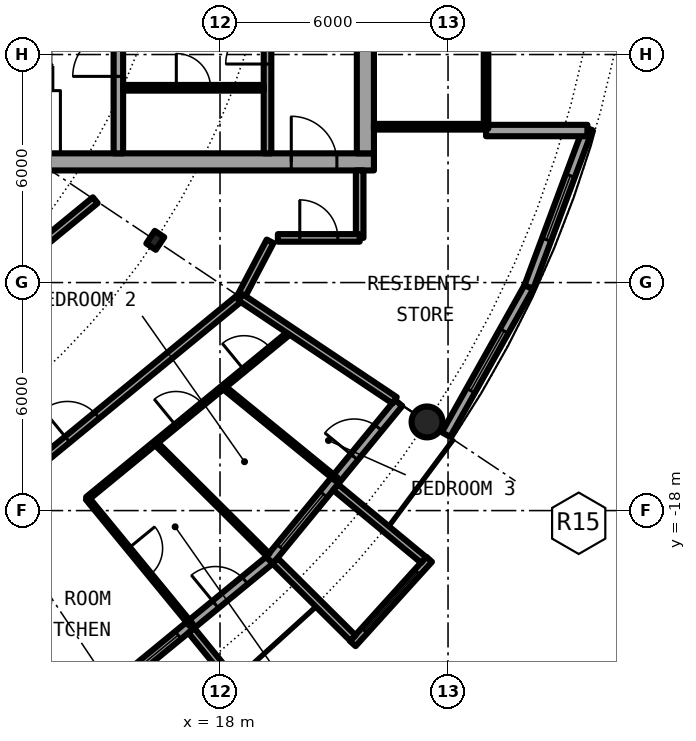
"""IFC4 building model, lengths in metres.
Left out: names, types, materials, properties, quantities, classifications, styles, units other than length and angle.
Written with IfcOpenShell. Run it as: python <this file> out.ifc"""

import sys

from ifc_helpers import new_model, si_unit, direction, frame, frame_2d, origin, origin_2d, place, context, subcontext, project, spatial, rectangle, circle, hollow_circle, i_section, extrude, element, fill, save


model = new_model("IFC4")
c1 = context("Model", 3, precision=1e-05, world=origin(), true_north=direction((0.0, 1.0)))
c2 = subcontext(c1, "Body", "Model", "MODEL_VIEW")
j1 = project(units=[si_unit("LENGTHUNIT", "METRE"), si_unit("PLANEANGLEUNIT", "RADIAN")], contexts=[c1])
p1 = place(None, origin())
s1 = spatial("IfcSite", under=j1, at=p1, CompositionType="ELEMENT")
p2 = place(p1, origin())
s2 = spatial("IfcBuilding", under=s1, at=p2, CompositionType="ELEMENT")
p3 = place(p2, frame((0.0, 0.0, 199.35)))
s3 = spatial("IfcBuildingStorey", under=s2, at=p3, CompositionType="ELEMENT", Elevation=199.35)
p4 = place(p3, frame((23.448, -15.667, 0.0), z_axis=(0.0, 0.0, 1.0), x_axis=(1.0, 0.0, 0.0)))
e1 = element("IfcColumn", 1, at=p4, inside=s3, PredefinedType="COLUMN", context=c2, shape_type="SweptSolid", body=[
    extrude(hollow_circle(Radius=0.406, WallThickness=0.03, at=origin_2d()), origin(), (0.0, 0.0, 1.0), 3.05),
])
p5 = place(p3, frame((16.297, -10.889, 0.0), z_axis=(0.0, 0.0, 1.0), x_axis=(0.831469612303, -0.55557023302, 0.0)))
e2 = element("IfcColumn", 2, at=p5, inside=s3, PredefinedType="COLUMN", context=c2, shape_type="SweptSolid", body=[
    extrude(i_section(OverallWidth=0.3, OverallDepth=0.4, WebThickness=0.013, FlangeThickness=0.024, FilletRadius=0.027, at=origin_2d()), origin(), (0.0, 0.0, 1.0), 3.05),
])
p6 = place(p3, frame((15.167, -22.699, 0.0), z_axis=(0.0, 0.0, 1.0), x_axis=(0.773019449054, 0.634382322723, 0.0)))
e3 = element("IfcWall", 3, at=p6, inside=s3, PredefinedType="SOLIDWALL", context=c2, shape_type="SweptSolid", body=[
    extrude(rectangle(XDim=5.352, YDim=0.25, at=frame_2d((2.676, 0.0))), origin(), (0.0, 0.0, 1.0), 2.7),
])
p7 = place(p6, frame((0.441, 0.0, 0.3)))
e4 = element("IfcOpeningElement", 4, at=p7, cuts=e3, PredefinedType="OPENING", context=c2, shape_type="SweptSolid", body=[
    extrude(rectangle(XDim=1.8, YDim=2.1, at=frame_2d((0.9, 1.05))), frame((0.0, 0.135, 0.0), z_axis=(0.0, -1.0, 0.0), x_axis=(1.0, 0.0, 0.0)), (0.0, 0.0, 1.0), 0.27),
])
p8 = place(p6, frame((3.51, 0.0, 0.0)))
e5 = element("IfcOpeningElement", 5, at=p8, cuts=e3, PredefinedType="OPENING", context=c2, shape_type="SweptSolid", body=[
    extrude(rectangle(XDim=1.0, YDim=2.2, at=frame_2d((0.5, 1.1))), frame((0.0, 0.135, 0.0), z_axis=(0.0, -1.0, 0.0), x_axis=(1.0, 0.0, 0.0)), (0.0, 0.0, 1.0), 0.27),
])
p9 = place(p3, frame((17.246, -21.155, -0.03), z_axis=(0.0, 0.0, 1.0), x_axis=(0.631741648902, -0.775179004516, 0.0)))
e6 = element("IfcWall", 6, at=p9, inside=s3, PredefinedType="SOLIDWALL", context=c2, shape_type="SweptSolid", body=[
    extrude(rectangle(XDim=3.006, YDim=0.2, at=frame_2d((1.503, 0.0))), origin(), (0.0, 0.0, 1.0), 2.73),
])
p10 = place(p3, frame((19.304, -19.304, 0.0), z_axis=(0.0, 0.0, 1.0), x_axis=(0.634382322723, 0.773019449054, 0.0)))
e7 = element("IfcWall", 7, at=p10, inside=s3, PredefinedType="SOLIDWALL", context=c2, shape_type="SweptSolid", body=[
    extrude(rectangle(XDim=5.352, YDim=0.25, at=frame_2d((2.676, 0.0))), origin(), (0.0, 0.0, 1.0), 2.7),
])
p11 = place(p10, frame((0.441, 0.0, 0.3)))
e8 = element("IfcOpeningElement", 8, at=p11, cuts=e7, PredefinedType="OPENING", context=c2, shape_type="SweptSolid", body=[
    extrude(rectangle(XDim=1.8, YDim=2.1, at=frame_2d((0.9, 1.05))), frame((0.0, 0.135, 0.0), z_axis=(0.0, -1.0, 0.0), x_axis=(1.0, 0.0, 0.0)), (0.0, 0.0, 1.0), 0.27),
])
p12 = place(p10, frame((3.51, 0.0, 0.0)))
e9 = element("IfcOpeningElement", 9, at=p12, cuts=e7, PredefinedType="OPENING", context=c2, shape_type="SweptSolid", body=[
    extrude(rectangle(XDim=1.0, YDim=2.2, at=frame_2d((0.5, 1.1))), frame((0.0, 0.135, 0.0), z_axis=(0.0, -1.0, 0.0), x_axis=(1.0, 0.0, 0.0)), (0.0, 0.0, 1.0), 0.27),
])
p13 = place(p3, frame((21.493, -21.5, -0.03), z_axis=(0.0, 0.0, 1.0), x_axis=(0.671506829416, 0.740998365753, 0.0)))
e10 = element("IfcWall", 10, at=p13, inside=s3, PredefinedType="SOLIDWALL", context=c2, shape_type="SweptSolid", body=[
    extrude(rectangle(XDim=2.993, YDim=0.2, at=frame_2d((1.497, 0.0))), origin(), (0.0, 0.0, 1.0), 2.73),
])
p14 = place(p13, frame((0.457, 0.0, 0.33)))
e11 = element("IfcOpeningElement", 11, at=p14, cuts=e10, PredefinedType="OPENING", context=c2, shape_type="SweptSolid", body=[
    extrude(circle(Radius=1.04, at=frame_2d((1.04, 1.04))), frame((0.0, 0.11, 0.0), z_axis=(0.0, -1.0, 0.0), x_axis=(1.0, 0.0, 0.0)), (0.0, 0.0, 1.0), 0.22),
])
p15 = place(p3, frame((19.45, -19.323, -0.03), z_axis=(0.0, 0.0, 1.0), x_axis=(0.709727076896, -0.704476739375, 0.0)))
e12 = element("IfcWall", 12, at=p15, inside=s3, PredefinedType="SOLIDWALL", context=c2, shape_type="SweptSolid", body=[
    extrude(rectangle(XDim=2.883, YDim=0.2, at=frame_2d((1.441, 0.0))), origin(), (0.0, 0.0, 1.0), 2.73),
])
p16 = place(p3, frame((21.041, -17.384, -0.03), z_axis=(0.0, 0.0, 1.0), x_axis=(0.770784861449, -0.63709551667, 0.0)))
e13 = element("IfcWall", 13, at=p16, inside=s3, PredefinedType="SOLIDWALL", context=c2, shape_type="SweptSolid", body=[
    extrude(rectangle(XDim=3.006, YDim=0.2, at=frame_2d((1.503, 0.0))), origin(), (0.0, 0.0, 1.0), 2.73),
])
p17 = place(p3, frame((23.946, -16.0, 0.0), z_axis=(0.0, 0.0, 1.0), x_axis=(0.489696356642, 0.871893042919, 0.0)))
e14 = element("IfcWall", 14, at=p17, inside=s3, PredefinedType="SOLIDWALL", context=c2, shape_type="SweptSolid", body=[
    extrude(rectangle(XDim=4.454, YDim=0.25, at=frame_2d((2.227, 0.0))), origin(), (0.0, 0.0, 1.0), 2.7),
])
p18 = place(p17, frame((1.327, 0.0, 0.3)))
e15 = element("IfcOpeningElement", 15, at=p18, cuts=e14, PredefinedType="OPENING", context=c2, shape_type="SweptSolid", body=[
    extrude(rectangle(XDim=1.8, YDim=2.1, at=frame_2d((0.9, 1.05))), frame((0.0, 0.135, 0.0), z_axis=(0.0, -1.0, 0.0), x_axis=(1.0, 0.0, 0.0)), (0.0, 0.0, 1.0), 0.27),
])
p19 = place(p3, frame((26.127, -12.117, 0.0), z_axis=(0.0, 0.0, 1.0), x_axis=(0.349247811493, 0.937030397675, 0.0)))
e16 = element("IfcWall", 16, at=p19, inside=s3, PredefinedType="SOLIDWALL", context=c2, shape_type="SweptSolid", body=[
    extrude(rectangle(XDim=4.452, YDim=0.25, at=frame_2d((2.226, 0.0))), origin(), (0.0, 0.0, 1.0), 2.7),
])
p20 = place(p19, frame((1.327, 0.0, 0.3)))
e17 = element("IfcOpeningElement", 17, at=p20, cuts=e16, PredefinedType="OPENING", context=c2, shape_type="SweptSolid", body=[
    extrude(rectangle(XDim=1.8, YDim=2.1, at=frame_2d((0.9, 1.05))), frame((0.0, 0.135, 0.0), z_axis=(0.0, -1.0, 0.0), x_axis=(1.0, 0.0, 0.0)), (0.0, 0.0, 1.0), 0.27),
])
p21 = place(p3, frame((25.0, -8.0, 0.0), z_axis=(0.0, 0.0, 1.0), x_axis=(1.0, 0.0, 0.0)))
e18 = element("IfcWall", 18, at=p21, inside=s3, PredefinedType="SOLIDWALL", context=c2, shape_type="SweptSolid", body=[
    extrude(rectangle(XDim=2.667, YDim=0.3, at=frame_2d((1.333, 0.0))), origin(), (0.0, 0.0, 1.0), 2.7),
])
p22 = place(p3, frame((8.55, -8.825, 0.0), z_axis=(0.0, 0.0, 1.0), x_axis=(1.0, 0.0, 0.0)))
e19 = element("IfcWall", 19, at=p22, inside=s3, PredefinedType="SHEAR", context=c2, shape_type="SweptSolid", body=[
    extrude(rectangle(XDim=13.5, YDim=0.45, at=frame_2d((6.75, 0.0))), origin(), (0.0, 0.0, 1.0), 3.05),
])
p23 = place(p22, frame((11.325, 0.0, 0.0)))
e20 = element("IfcOpeningElement", 20, at=p23, cuts=e19, PredefinedType="OPENING", context=c2, shape_type="SweptSolid", body=[
    extrude(rectangle(XDim=1.2, YDim=2.3, at=frame_2d((0.6, 1.15))), frame((0.0, 0.235, 0.0), z_axis=(0.0, -1.0, 0.0), x_axis=(1.0, 0.0, 0.0)), (0.0, 0.0, 1.0), 0.47),
])
p24 = place(p3, frame((21.825, 8.6, 0.0), z_axis=(0.0, 0.0, 1.0), x_axis=(0.0, -1.0, 0.0)))
e21 = element("IfcWall", 21, at=p24, inside=s3, PredefinedType="SHEAR", context=c2, shape_type="SweptSolid", body=[
    extrude(rectangle(XDim=17.2, YDim=0.45, at=frame_2d((8.6, 0.0))), origin(), (0.0, 0.0, 1.0), 3.05),
])
p25 = place(p24, frame((7.7, 0.0, 0.0)))
e22 = element("IfcOpeningElement", 22, at=p25, cuts=e21, PredefinedType="OPENING", context=c2, shape_type="SweptSolid", body=[
    extrude(rectangle(XDim=1.8, YDim=2.3, at=frame_2d((0.9, 1.15))), frame((0.0, 0.235, 0.0), z_axis=(0.0, -1.0, 0.0), x_axis=(1.0, 0.0, 0.0)), (0.0, 0.0, 1.0), 0.47),
])
p26 = place(p3, frame((15.325, -8.6, 0.0), z_axis=(0.0, 0.0, 1.0), x_axis=(0.0, 1.0, 0.0)))
e23 = element("IfcWall", 23, at=p26, inside=s3, PredefinedType="SHEAR", context=c2, shape_type="SweptSolid", body=[
    extrude(rectangle(XDim=3.95, YDim=0.25, at=frame_2d((1.975, 0.0))), origin(), (0.0, 0.0, 1.0), 3.05),
])
p27 = place(p26, frame((2.025, 0.0, 0.0)))
e24 = element("IfcOpeningElement", 24, at=p27, cuts=e23, PredefinedType="OPENING", context=c2, shape_type="SweptSolid", body=[
    extrude(rectangle(XDim=1.2, YDim=2.3, at=frame_2d((0.6, 1.15))), frame((0.0, 0.135, 0.0), z_axis=(0.0, -1.0, 0.0), x_axis=(1.0, 0.0, 0.0)), (0.0, 0.0, 1.0), 0.27),
])
p28 = place(p3, frame((19.25, -8.6, 0.0), z_axis=(0.0, 0.0, 1.0), x_axis=(0.0, 1.0, 0.0)))
e25 = element("IfcWall", 25, at=p28, inside=s3, PredefinedType="SOLIDWALL", context=c2, shape_type="SweptSolid", body=[
    extrude(rectangle(XDim=7.025, YDim=0.2, at=frame_2d((3.513, 0.0))), origin(), (0.0, 0.0, 1.0), 2.7),
])
p29 = place(p28, frame((2.35, 0.0, 0.0)))
e26 = element("IfcOpeningElement", 26, at=p29, cuts=e25, PredefinedType="OPENING", context=c2, shape_type="SweptSolid", body=[
    extrude(rectangle(XDim=1.1, YDim=2.3, at=frame_2d((0.55, 1.15))), frame((0.0, 0.11, 0.0), z_axis=(0.0, -1.0, 0.0), x_axis=(1.0, 0.0, 0.0)), (0.0, 0.0, 1.0), 0.22),
])
p30 = place(p3, frame((15.45, -6.875, 0.0), z_axis=(0.0, 0.0, 1.0), x_axis=(1.0, 0.0, 0.0)))
e27 = element("IfcWall", 27, at=p30, inside=s3, PredefinedType="PARTITIONING", context=c2, shape_type="SweptSolid", body=[
    extrude(rectangle(XDim=3.7, YDim=0.15, at=frame_2d((1.85, 0.0))), origin(), (0.0, 0.0, 1.0), 2.7),
])
p31 = place(p30, frame((1.4, 0.0, 0.0)))
e28 = element("IfcOpeningElement", 28, at=p31, cuts=e27, PredefinedType="OPENING", context=c2, shape_type="SweptSolid", body=[
    extrude(rectangle(XDim=0.9, YDim=2.3, at=frame_2d((0.45, 1.15))), frame((0.0, 0.085, 0.0), z_axis=(0.0, -1.0, 0.0), x_axis=(1.0, 0.0, 0.0)), (0.0, 0.0, 1.0), 0.17),
])
p32 = place(p3, frame((22.05, -7.9, 0.0), z_axis=(0.0, 0.0, 1.0), x_axis=(1.0, 0.0, 0.0)))
e29 = element("IfcWall", 29, at=p32, inside=s3, PredefinedType="PARTITIONING", context=c2, shape_type="SweptSolid", body=[
    extrude(rectangle(XDim=2.89, YDim=0.15, at=frame_2d((1.445, 0.0))), origin(), (0.0, 0.0, 1.0), 2.7),
])
p33 = place(p3, frame((25.0, -7.95, 0.0), z_axis=(0.0, 0.0, 1.0), x_axis=(0.0, 1.0, 0.0)))
e30 = element("IfcWall", 30, at=p33, inside=s3, PredefinedType="PARTITIONING", context=c2, shape_type="SweptSolid", body=[
    extrude(rectangle(XDim=15.9, YDim=0.12, at=frame_2d((7.95, 0.0))), origin(), (0.0, 0.0, 1.0), 2.7),
])
p34 = place(p33, frame((0.95, 0.0, 0.1)))
e31 = element("IfcOpeningElement", 31, at=p34, cuts=e30, PredefinedType="OPENING", context=c2, shape_type="SweptSolid", body=[
    extrude(rectangle(XDim=14.0, YDim=2.35, at=frame_2d((7.0, 1.175))), frame((0.0, 0.07, 0.0), z_axis=(0.0, -1.0, 0.0), x_axis=(1.0, 0.0, 0.0)), (0.0, 0.0, 1.0), 0.14),
])
p35 = place(p3, frame((14.508, -17.681, 0.0), z_axis=(0.0, 0.0, 1.0), x_axis=(0.773155647559, 0.634216323227, 0.0)))
e32 = element("IfcWall", 32, at=p35, inside=s3, PredefinedType="PARTITIONING", context=c2, shape_type="SweptSolid", body=[
    extrude(rectangle(XDim=6.939, YDim=0.1, at=frame_2d((3.469, 0.0))), origin(), (0.0, 0.0, 1.0), 2.7),
])
p36 = place(p35, frame((3.019, 0.0, 0.0)))
e33 = element("IfcOpeningElement", 33, at=p36, cuts=e32, PredefinedType="OPENING", context=c2, shape_type="SweptSolid", body=[
    extrude(rectangle(XDim=0.9, YDim=2.3, at=frame_2d((0.45, 1.15))), frame((0.0, 0.06, 0.0), z_axis=(0.0, -1.0, 0.0), x_axis=(1.0, 0.0, 0.0)), (0.0, 0.0, 1.0), 0.12),
])
p37 = place(p35, frame((5.334, 0.0, 0.0)))
e34 = element("IfcOpeningElement", 34, at=p37, cuts=e32, PredefinedType="OPENING", context=c2, shape_type="SweptSolid", body=[
    extrude(rectangle(XDim=0.9, YDim=2.3, at=frame_2d((0.45, 1.15))), frame((0.0, 0.06, 0.0), z_axis=(0.0, -1.0, 0.0), x_axis=(1.0, 0.0, 0.0)), (0.0, 0.0, 1.0), 0.12),
])
p38 = place(p3, frame((18.542, -12.389, 0.0), z_axis=(0.0, 0.0, 1.0), x_axis=(0.465359652486, 0.885121683068, 0.0)))
e35 = element("IfcWall", 35, at=p38, inside=s3, PredefinedType="PARTITIONING", context=c2, shape_type="SweptSolid", body=[
    extrude(rectangle(XDim=1.665, YDim=0.2, at=frame_2d((0.833, 0.0))), origin(), (0.0, 0.0, 1.0), 2.7),
])
p39 = place(p3, frame((21.675, -10.825, 0.0), z_axis=(0.0, 0.0, 1.0), x_axis=(0.0, 1.0, 0.0)))
e36 = element("IfcWall", 36, at=p39, inside=s3, PredefinedType="PARTITIONING", context=c2, shape_type="SweptSolid", body=[
    extrude(rectangle(XDim=1.775, YDim=0.2, at=frame_2d((0.887, 0.0))), origin(), (0.0, 0.0, 1.0), 2.7),
])
p40 = place(p3, frame((8.534, -20.603, 0.0), z_axis=(0.0, 0.0, 1.0), x_axis=(0.772983503654, 0.634426121056, 0.0)))
e37 = element("IfcWall", 37, at=p40, inside=s3, PredefinedType="PARTITIONING", context=c2, shape_type="SweptSolid", body=[
    extrude(rectangle(XDim=12.947, YDim=0.2, at=frame_2d((6.474, 0.0))), origin(), (0.0, 0.0, 1.0), 2.7),
])
p41 = place(p40, frame((7.053, 0.0, 0.0)))
e38 = element("IfcOpeningElement", 38, at=p41, cuts=e37, PredefinedType="OPENING", context=c2, shape_type="SweptSolid", body=[
    extrude(rectangle(XDim=1.0, YDim=2.3, at=frame_2d((0.5, 1.15))), frame((0.0, 0.11, 0.0), z_axis=(0.0, -1.0, 0.0), x_axis=(1.0, 0.0, 0.0)), (0.0, 0.0, 1.0), 0.22),
])
p42 = place(p3, frame((6.773, -16.353, 0.0), z_axis=(0.0, 0.0, 1.0), x_axis=(0.773034536097, 0.634363938131, 0.0)))
e39 = element("IfcWall", 39, at=p42, inside=s3, PredefinedType="PARTITIONING", context=c2, shape_type="SweptSolid", body=[
    extrude(rectangle(XDim=10.277, YDim=0.2, at=frame_2d((5.138, 0.0))), origin(), (0.0, 0.0, 1.0), 2.7),
])
p43 = place(p42, frame((4.638, 0.0, 0.0)))
e40 = element("IfcOpeningElement", 40, at=p43, cuts=e39, PredefinedType="OPENING", context=c2, shape_type="SweptSolid", body=[
    extrude(rectangle(XDim=1.0, YDim=2.3, at=frame_2d((0.5, 1.15))), frame((0.0, 0.11, 0.0), z_axis=(0.0, -1.0, 0.0), x_axis=(1.0, 0.0, 0.0)), (0.0, 0.0, 1.0), 0.22),
])
p44 = place(p3, frame((19.523, -10.825, 0.0), z_axis=(0.0, 0.0, 1.0), x_axis=(1.0, 0.0, 0.0)))
e41 = element("IfcWall", 41, at=p44, inside=s3, PredefinedType="PARTITIONING", context=c2, shape_type="SweptSolid", body=[
    extrude(rectangle(XDim=2.152, YDim=0.2, at=frame_2d((1.076, 0.0))), origin(), (0.0, 0.0, 1.0), 2.7),
])
p45 = place(p44, frame((0.576, 0.0, 0.0)))
e42 = element("IfcOpeningElement", 42, at=p45, cuts=e41, PredefinedType="OPENING", context=c2, shape_type="SweptSolid", body=[
    extrude(rectangle(XDim=1.0, YDim=2.3, at=frame_2d((0.5, 1.15))), frame((0.0, 0.11, 0.0), z_axis=(0.0, -1.0, 0.0), x_axis=(1.0, 0.0, 0.0)), (0.0, 0.0, 1.0), 0.22),
])
p46 = place(p3, frame((14.509, -17.679, 0.0), z_axis=(0.0, 0.0, 1.0), x_axis=(0.634342681687, -0.77305197897, 0.0)))
e43 = element("IfcWall", 43, at=p46, inside=s3, PredefinedType="PARTITIONING", context=c2, shape_type="SweptSolid", body=[
    extrude(rectangle(XDim=4.305, YDim=0.1, at=frame_2d((2.153, 0.0))), origin(), (0.0, 0.0, 1.0), 2.7),
])
p47 = place(p46, frame((1.703, 0.0, 0.0)))
e44 = element("IfcOpeningElement", 44, at=p47, cuts=e43, PredefinedType="OPENING", context=c2, shape_type="SweptSolid", body=[
    extrude(rectangle(XDim=0.9, YDim=2.3, at=frame_2d((0.45, 1.15))), frame((0.0, 0.06, 0.0), z_axis=(0.0, -1.0, 0.0), x_axis=(1.0, 0.0, 0.0)), (0.0, 0.0, 1.0), 0.12),
])
p48 = place(p3, frame((16.296, -16.213, 0.0), z_axis=(0.0, 0.0, 1.0), x_axis=(0.708999026534, -0.705209458511, 0.0)))
e45 = element("IfcWall", 45, at=p48, inside=s3, PredefinedType="PARTITIONING", context=c2, shape_type="SweptSolid", body=[
    extrude(rectangle(XDim=4.188, YDim=0.1, at=frame_2d((2.094, 0.0))), origin(), (0.0, 0.0, 1.0), 2.7),
])
p49 = place(p3, frame((18.084, -14.745, 0.0), z_axis=(0.0, 0.0, 1.0), x_axis=(0.77495020745, -0.632022290724, 0.0)))
e46 = element("IfcWall", 46, at=p49, inside=s3, PredefinedType="PARTITIONING", context=c2, shape_type="SweptSolid", body=[
    extrude(rectangle(XDim=3.842, YDim=0.1, at=frame_2d((1.921, 0.0))), origin(), (0.0, 0.0, 1.0), 2.7),
])
p50 = place(p3, frame((18.542, -12.389, 0.0), z_axis=(0.0, 0.0, 1.0), x_axis=(0.831387096605, -0.55569370664, 0.0)))
e47 = element("IfcWall", 47, at=p50, inside=s3, PredefinedType="PARTITIONING", context=c2, shape_type="SweptSolid", body=[
    extrude(rectangle(XDim=4.875, YDim=0.2, at=frame_2d((2.438, 0.0))), origin(), (0.0, 0.0, 1.0), 2.7),
])
p51 = place(p7, origin())
e48 = element("IfcWindow", 48, at=p51, inside=s3, PartitioningType="SINGLE_PANEL", PredefinedType="WINDOW", context=c2, shape_type="SweptSolid", body=[
    extrude(rectangle(XDim=1.8, YDim=2.1, at=frame_2d((0.9, 1.05))), frame((0.0, 0.03, 0.0), z_axis=(0.0, -1.0, 0.0), x_axis=(1.0, 0.0, 0.0)), (0.0, 0.0, 1.0), 0.06),
])
fill(e4, e48)
p52 = place(p8, origin())
e49 = element("IfcDoor", 49, at=p52, inside=s3, OperationType="SINGLE_SWING_LEFT", PredefinedType="DOOR", context=c2, shape_type="SweptSolid", body=[
    extrude(rectangle(XDim=1.0, YDim=2.2, at=frame_2d((0.5, 1.1))), frame((0.0, 0.025, 0.0), z_axis=(0.0, -1.0, 0.0), x_axis=(1.0, 0.0, 0.0)), (0.0, 0.0, 1.0), 0.05),
])
fill(e5, e49)
p53 = place(p11, origin())
e50 = element("IfcWindow", 50, at=p53, inside=s3, PartitioningType="SINGLE_PANEL", PredefinedType="WINDOW", context=c2, shape_type="SweptSolid", body=[
    extrude(rectangle(XDim=1.8, YDim=2.1, at=frame_2d((0.9, 1.05))), frame((0.0, 0.03, 0.0), z_axis=(0.0, -1.0, 0.0), x_axis=(1.0, 0.0, 0.0)), (0.0, 0.0, 1.0), 0.06),
])
fill(e8, e50)
p54 = place(p14, origin())
e51 = element("IfcWindow", 51, at=p54, inside=s3, PartitioningType="SINGLE_PANEL", PredefinedType="WINDOW", context=c2, shape_type="SweptSolid", body=[
    extrude(circle(Radius=1.04, at=frame_2d((1.04, 1.04))), frame((0.0, 0.03, 0.0), z_axis=(0.0, -1.0, 0.0), x_axis=(1.0, 0.0, 0.0)), (0.0, 0.0, 1.0), 0.06),
])
fill(e11, e51)
p55 = place(p12, origin())
e52 = element("IfcDoor", 52, at=p55, inside=s3, OperationType="SINGLE_SWING_LEFT", PredefinedType="DOOR", context=c2, shape_type="SweptSolid", body=[
    extrude(rectangle(XDim=1.0, YDim=2.2, at=frame_2d((0.5, 1.1))), frame((0.0, 0.025, 0.0), z_axis=(0.0, -1.0, 0.0), x_axis=(1.0, 0.0, 0.0)), (0.0, 0.0, 1.0), 0.05),
])
fill(e9, e52)
p56 = place(p18, origin())
e53 = element("IfcWindow", 53, at=p56, inside=s3, PartitioningType="SINGLE_PANEL", PredefinedType="WINDOW", context=c2, shape_type="SweptSolid", body=[
    extrude(rectangle(XDim=1.8, YDim=2.1, at=frame_2d((0.9, 1.05))), frame((0.0, 0.03, 0.0), z_axis=(0.0, -1.0, 0.0), x_axis=(1.0, 0.0, 0.0)), (0.0, 0.0, 1.0), 0.06),
])
fill(e15, e53)
p57 = place(p20, origin())
e54 = element("IfcWindow", 54, at=p57, inside=s3, PartitioningType="SINGLE_PANEL", PredefinedType="WINDOW", context=c2, shape_type="SweptSolid", body=[
    extrude(rectangle(XDim=1.8, YDim=2.1, at=frame_2d((0.9, 1.05))), frame((0.0, 0.03, 0.0), z_axis=(0.0, -1.0, 0.0), x_axis=(1.0, 0.0, 0.0)), (0.0, 0.0, 1.0), 0.06),
])
fill(e17, e54)
p58 = place(p31, origin())
e55 = element("IfcDoor", 55, at=p58, inside=s3, OperationType="SINGLE_SWING_LEFT", PredefinedType="DOOR", context=c2, shape_type="SweptSolid", body=[
    extrude(rectangle(XDim=0.9, YDim=2.3, at=frame_2d((0.45, 1.15))), frame((0.0, 0.025, 0.0), z_axis=(0.0, -1.0, 0.0), x_axis=(1.0, 0.0, 0.0)), (0.0, 0.0, 1.0), 0.05),
])
fill(e28, e55)
p59 = place(p27, origin())
e56 = element("IfcDoor", 56, at=p59, inside=s3, OperationType="SINGLE_SWING_LEFT", PredefinedType="DOOR", context=c2, shape_type="SweptSolid", body=[
    extrude(rectangle(XDim=1.2, YDim=2.3, at=frame_2d((0.6, 1.15))), frame((0.0, 0.025, 0.0), z_axis=(0.0, -1.0, 0.0), x_axis=(1.0, 0.0, 0.0)), (0.0, 0.0, 1.0), 0.05),
])
fill(e24, e56)
p60 = place(p29, origin())
e57 = element("IfcDoor", 57, at=p60, inside=s3, OperationType="SINGLE_SWING_RIGHT", PredefinedType="DOOR", context=c2, shape_type="SweptSolid", body=[
    extrude(rectangle(XDim=1.1, YDim=2.3, at=frame_2d((0.55, 1.15))), frame((0.0, 0.025, 0.0), z_axis=(0.0, -1.0, 0.0), x_axis=(1.0, 0.0, 0.0)), (0.0, 0.0, 1.0), 0.05),
])
fill(e26, e57)
p61 = place(p23, origin())
e58 = element("IfcDoor", 58, at=p61, inside=s3, OperationType="SINGLE_SWING_LEFT", PredefinedType="DOOR", context=c2, shape_type="SweptSolid", body=[
    extrude(rectangle(XDim=1.2, YDim=2.3, at=frame_2d((0.6, 1.15))), frame((0.0, 0.025, 0.0), z_axis=(0.0, -1.0, 0.0), x_axis=(1.0, 0.0, 0.0)), (0.0, 0.0, 1.0), 0.05),
])
fill(e20, e58)
p62 = place(p34, origin())
e59 = element("IfcWindow", 59, at=p62, inside=s3, PartitioningType="SINGLE_PANEL", PredefinedType="WINDOW", context=c2, shape_type="SweptSolid", body=[
    extrude(rectangle(XDim=14.0, YDim=2.35, at=frame_2d((7.0, 1.175))), frame((0.0, 0.03, 0.0), z_axis=(0.0, -1.0, 0.0), x_axis=(1.0, 0.0, 0.0)), (0.0, 0.0, 1.0), 0.06),
])
fill(e31, e59)
p63 = place(p41, origin())
e60 = element("IfcDoor", 60, at=p63, inside=s3, OperationType="SINGLE_SWING_RIGHT", PredefinedType="DOOR", context=c2, shape_type="SweptSolid", body=[
    extrude(rectangle(XDim=1.0, YDim=2.3, at=frame_2d((0.5, 1.15))), frame((0.0, 0.025, 0.0), z_axis=(0.0, -1.0, 0.0), x_axis=(1.0, 0.0, 0.0)), (0.0, 0.0, 1.0), 0.05),
])
fill(e38, e60)
p64 = place(p47, origin())
e61 = element("IfcDoor", 61, at=p64, inside=s3, OperationType="SINGLE_SWING_RIGHT", PredefinedType="DOOR", context=c2, shape_type="SweptSolid", body=[
    extrude(rectangle(XDim=0.9, YDim=2.3, at=frame_2d((0.45, 1.15))), frame((0.0, 0.025, 0.0), z_axis=(0.0, -1.0, 0.0), x_axis=(1.0, 0.0, 0.0)), (0.0, 0.0, 1.0), 0.05),
])
fill(e44, e61)
p65 = place(p36, origin())
e62 = element("IfcDoor", 62, at=p65, inside=s3, OperationType="SINGLE_SWING_LEFT", PredefinedType="DOOR", context=c2, shape_type="SweptSolid", body=[
    extrude(rectangle(XDim=0.9, YDim=2.3, at=frame_2d((0.45, 1.15))), frame((0.0, 0.025, 0.0), z_axis=(0.0, -1.0, 0.0), x_axis=(1.0, 0.0, 0.0)), (0.0, 0.0, 1.0), 0.05),
])
fill(e33, e62)
p66 = place(p37, origin())
e63 = element("IfcDoor", 63, at=p66, inside=s3, OperationType="SINGLE_SWING_RIGHT", PredefinedType="DOOR", context=c2, shape_type="SweptSolid", body=[
    extrude(rectangle(XDim=0.9, YDim=2.3, at=frame_2d((0.45, 1.15))), frame((0.0, 0.025, 0.0), z_axis=(0.0, -1.0, 0.0), x_axis=(1.0, 0.0, 0.0)), (0.0, 0.0, 1.0), 0.05),
])
fill(e34, e63)
p67 = place(p45, origin())
e64 = element("IfcDoor", 64, at=p67, inside=s3, OperationType="SINGLE_SWING_LEFT", PredefinedType="DOOR", context=c2, shape_type="SweptSolid", body=[
    extrude(rectangle(XDim=1.0, YDim=2.3, at=frame_2d((0.5, 1.15))), frame((0.0, 0.025, 0.0), z_axis=(0.0, -1.0, 0.0), x_axis=(1.0, 0.0, 0.0)), (0.0, 0.0, 1.0), 0.05),
])
fill(e42, e64)
save(model, sys.argv[1])
